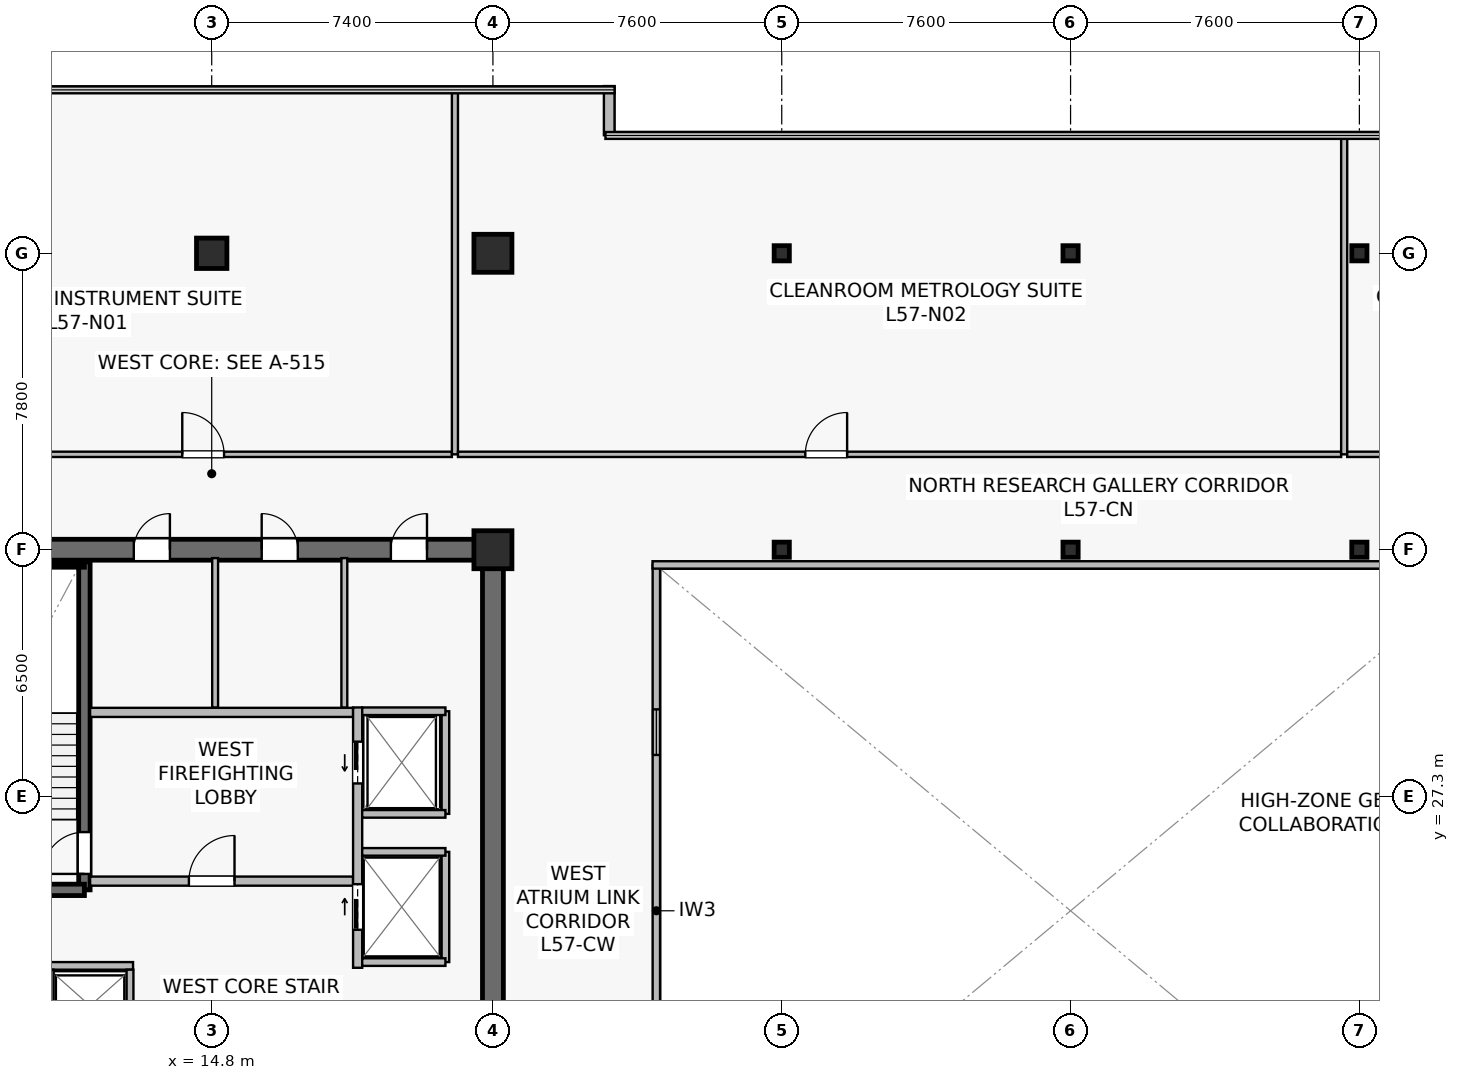
"""IFC4 building model, lengths in metres.
Left out: names, types, materials, properties, quantities, classifications, styles, units other than length and angle.
Written with IfcOpenShell. Run it as: python <this file> out.ifc"""

import sys

from ifc_helpers import new_model, si_unit, direction, frame, frame_2d, origin, origin_2d, place, context, subcontext, project, spatial, rectangle, hollow_rectangle, extrude, source, transform, mapped, element, fill, save


model = new_model("IFC4")
c1 = context("Model", 3, precision=1e-05, world=origin(), true_north=direction((0.0, 1.0)))
c2 = subcontext(c1, "Body", "Model", "MODEL_VIEW")
j1 = project(units=[si_unit("LENGTHUNIT", "METRE"), si_unit("PLANEANGLEUNIT", "RADIAN")], contexts=[c1])
p1 = place(None, origin())
s1 = spatial("IfcSite", under=j1, at=p1, CompositionType="ELEMENT")
p2 = place(p1, origin())
s2 = spatial("IfcBuilding", under=s1, at=p2, CompositionType="ELEMENT")
p3 = place(p2, frame((0.0, 0.0, 238.3)))
s3 = spatial("IfcBuildingStorey", under=s2, at=p3, CompositionType="ELEMENT", Elevation=238.3)
p4 = place(p3, frame((7.125, 33.8, 0.0), z_axis=(0.0, 0.0, 1.0), x_axis=(1.0, 0.0, 0.0)))
e1 = element("IfcWall", 1, at=p4, inside=s3, PredefinedType="SHEAR", context=c2, shape_type="SweptSolid", body=[
    extrude(rectangle(XDim=15.35, YDim=0.55, at=frame_2d((7.675, 0.0))), origin(), (0.0, 0.0, 1.0), 3.8),
])
p5 = place(p4, frame((5.625, 0.0, 0.0)))
e2 = element("IfcOpeningElement", 2, at=p5, cuts=e1, PredefinedType="OPENING", context=c2, shape_type="SweptSolid", body=[
    extrude(rectangle(XDim=0.95, YDim=2.15, at=frame_2d((0.475, 1.075))), frame((0.0, 0.285, 0.0), z_axis=(0.0, -1.0, 0.0), x_axis=(1.0, 0.0, 0.0)), (0.0, 0.0, 1.0), 0.57),
])
p6 = place(p4, frame((8.99, 0.0, 0.0)))
e3 = element("IfcOpeningElement", 3, at=p6, cuts=e1, PredefinedType="OPENING", context=c2, shape_type="SweptSolid", body=[
    extrude(rectangle(XDim=0.95, YDim=2.15, at=frame_2d((0.475, 1.075))), frame((0.0, 0.285, 0.0), z_axis=(0.0, -1.0, 0.0), x_axis=(1.0, 0.0, 0.0)), (0.0, 0.0, 1.0), 0.57),
])
p7 = place(p4, frame((12.39, 0.0, 0.0)))
e4 = element("IfcOpeningElement", 4, at=p7, cuts=e1, PredefinedType="OPENING", context=c2, shape_type="SweptSolid", body=[
    extrude(rectangle(XDim=0.95, YDim=2.15, at=frame_2d((0.475, 1.075))), frame((0.0, 0.285, 0.0), z_axis=(0.0, -1.0, 0.0), x_axis=(1.0, 0.0, 0.0)), (0.0, 0.0, 1.0), 0.57),
])
p8 = place(p3, frame((22.2, 15.075, 0.0), z_axis=(0.0, 0.0, 1.0), x_axis=(0.0, 1.0, 0.0)))
e5 = element("IfcWall", 5, at=p8, inside=s3, PredefinedType="SHEAR", context=c2, shape_type="SweptSolid", body=[
    extrude(rectangle(XDim=18.45, YDim=0.55, at=frame_2d((9.225, 0.0))), origin(), (0.0, 0.0, 1.0), 3.8),
])
p9 = place(p8, frame((3.475, 0.0, 0.0)))
e6 = element("IfcOpeningElement", 6, at=p9, cuts=e5, PredefinedType="OPENING", context=c2, shape_type="SweptSolid", body=[
    extrude(rectangle(XDim=1.42, YDim=2.2, at=frame_2d((0.71, 1.1))), frame((0.0, 0.285, 0.0), z_axis=(0.0, -1.0, 0.0), x_axis=(1.0, 0.0, 0.0)), (0.0, 0.0, 1.0), 0.57),
])
p10 = place(p3, frame((11.45, 24.85, 0.0), z_axis=(0.0, 0.0, 1.0), x_axis=(0.0, 1.0, 0.0)))
e7 = element("IfcWall", 7, at=p10, inside=s3, PredefinedType="SHEAR", context=c2, shape_type="SweptSolid", body=[
    extrude(rectangle(XDim=8.63, YDim=0.3, at=frame_2d((4.315, 0.0))), origin(), (0.0, 0.0, 1.0), 3.8),
])
p11 = place(p10, frame((0.42, 0.0, 0.0)))
e8 = element("IfcOpeningElement", 8, at=p11, cuts=e7, PredefinedType="OPENING", context=c2, shape_type="SweptSolid", body=[
    extrude(rectangle(XDim=1.1, YDim=2.15, at=frame_2d((0.55, 1.075))), frame((0.0, 0.16, 0.0), z_axis=(0.0, -1.0, 0.0), x_axis=(1.0, 0.0, 0.0)), (0.0, 0.0, 1.0), 0.32),
])
p12 = place(p3, frame((7.65, 24.85, 0.0), z_axis=(0.0, 0.0, 1.0), x_axis=(1.0, 0.0, 0.0)))
e9 = element("IfcWall", 9, at=p12, inside=s3, PredefinedType="SHEAR", context=c2, shape_type="SweptSolid", body=[
    extrude(rectangle(XDim=3.8, YDim=0.3, at=frame_2d((1.9, 0.0))), origin(), (0.0, 0.0, 1.0), 3.8),
])
p13 = place(p3, frame((7.73, 33.4, 0.0), z_axis=(0.0, 0.0, 1.0), x_axis=(1.0, 0.0, 0.0)))
e10 = element("IfcWall", 10, at=p13, inside=s3, PredefinedType="SOLIDWALL", context=c2, shape_type="SweptSolid", body=[
    extrude(rectangle(XDim=3.72, YDim=0.12, at=frame_2d((1.86, 0.0))), origin(), (0.0, 0.0, 1.0), 3.8),
])
m1 = source(origin(), c2, "Body", "SweptSolid", [
    extrude(rectangle(XDim=1.0, YDim=1.0, at=origin_2d()), origin(), (0.0, 0.0, 1.0), 4.1),
])
p14 = place(p3, frame((22.2, 33.8, 0.0), z_axis=(0.0, 0.0, 1.0), x_axis=(1.0, 0.0, 0.0)))
e11 = element("IfcColumn", 11, at=p14, inside=s3, PredefinedType="COLUMN", context=c2, shape_type="MappedRepresentation", body=[
    mapped(m1, transform((0.0, 0.0, 0.0), scale=1.0)),
])
m2 = source(origin(), c2, "Body", "SweptSolid", [
    extrude(rectangle(XDim=0.8, YDim=0.8, at=origin_2d()), origin(), (0.0, 0.0, 1.0), 4.1),
])
p15 = place(p3, frame((14.8, 41.6, 0.0), z_axis=(0.0, 0.0, 1.0), x_axis=(1.0, 0.0, 0.0)))
e12 = element("IfcColumn", 12, at=p15, inside=s3, PredefinedType="COLUMN", context=c2, shape_type="MappedRepresentation", body=[
    mapped(m2, transform((0.0, 0.0, 0.0), scale=1.0)),
])
p16 = place(p3, frame((22.2, 41.6, 0.0), z_axis=(0.0, 0.0, 1.0), x_axis=(1.0, 0.0, 0.0)))
e13 = element("IfcColumn", 13, at=p16, inside=s3, PredefinedType="COLUMN", context=c2, shape_type="MappedRepresentation", body=[
    mapped(m1, transform((0.0, 0.0, 0.0), scale=1.0)),
])
m3 = source(origin(), c2, "Body", "SweptSolid", [
    extrude(hollow_rectangle(XDim=0.4, YDim=0.4, WallThickness=0.019, at=origin_2d()), origin(), (0.0, 0.0, 1.0), 4.1),
])
for number, where, z_axis, x_axis in (
    (14, (29.8, 33.8, 0.0), (0.0, 0.0, 1.0), (1.0, 0.0, 0.0)),
    (15, (29.8, 41.6, 0.0), (0.0, 0.0, 1.0), (1.0, 0.0, 0.0)),
    (16, (37.4, 33.8, 0.0), (0.0, 0.0, 1.0), (1.0, 0.0, 0.0)),
    (17, (37.4, 41.6, 0.0), (0.0, 0.0, 1.0), (1.0, 0.0, 0.0)),
    (18, (45.0, 33.8, 0.0), (0.0, 0.0, 1.0), (1.0, 0.0, 0.0)),
    (19, (45.0, 41.6, 0.0), (0.0, 0.0, 1.0), (1.0, 0.0, 0.0)),
):
    element("IfcColumn", number, at=place(p3, frame(where, z_axis=z_axis, x_axis=x_axis)), inside=s3, PredefinedType="COLUMN", context=c2, shape_type="MappedRepresentation", body=[
        mapped(m3, transform((0.0, 0.0, 0.0), scale=1.0)),
    ])
p17 = place(p3, frame((25.26, 44.707, 0.0), z_axis=(0.0, 0.0, 1.0), x_axis=(0.0, 1.0, 0.0)))
e20 = element("IfcWall", 20, at=p17, inside=s3, PredefinedType="STANDARD", context=c2, shape_type="SweptSolid", body=[
    extrude(rectangle(XDim=1.293, YDim=0.28, at=frame_2d((0.646, 0.0))), origin(), (0.0, 0.0, 1.0), 3.8),
])
p18 = place(p3, frame((11.6, 25.08, 0.0), z_axis=(0.0, 0.0, 1.0), x_axis=(1.0, 0.0, 0.0)))
e21 = element("IfcWall", 21, at=p18, inside=s3, PredefinedType="SOLIDWALL", context=c2, shape_type="SweptSolid", body=[
    extrude(rectangle(XDim=6.92, YDim=0.24, at=frame_2d((3.46, 0.0))), origin(), (0.0, 0.0, 1.0), 3.197),
])
p19 = place(p18, frame((2.6, 0.0, 0.0)))
e22 = element("IfcOpeningElement", 22, at=p19, cuts=e21, PredefinedType="OPENING", context=c2, shape_type="SweptSolid", body=[
    extrude(rectangle(XDim=1.2, YDim=2.16, at=frame_2d((0.6, 1.08))), frame((0.0, 0.13, 0.0), z_axis=(0.0, -1.0, 0.0), x_axis=(1.0, 0.0, 0.0)), (0.0, 0.0, 1.0), 0.26),
])
p20 = place(p3, frame((11.6, 29.52, 0.0), z_axis=(0.0, 0.0, 1.0), x_axis=(1.0, 0.0, 0.0)))
e23 = element("IfcWall", 23, at=p20, inside=s3, PredefinedType="SOLIDWALL", context=c2, shape_type="SweptSolid", body=[
    extrude(rectangle(XDim=6.92, YDim=0.24, at=frame_2d((3.46, 0.0))), origin(), (0.0, 0.0, 1.0), 3.197),
])
p21 = place(p3, frame((18.64, 22.8, 0.0), z_axis=(0.0, 0.0, 1.0), x_axis=(0.0, 1.0, 0.0)))
e24 = element("IfcWall", 24, at=p21, inside=s3, PredefinedType="SOLIDWALL", context=c2, shape_type="SweptSolid", body=[
    extrude(rectangle(XDim=6.85, YDim=0.24, at=frame_2d((3.425, 0.0))), origin(), (0.0, 0.0, 1.0), 2.935),
])
p22 = place(p21, frame((4.85, 0.0, 0.0)))
e25 = element("IfcOpeningElement", 25, at=p22, cuts=e24, PredefinedType="OPENING", context=c2, shape_type="SweptSolid", body=[
    extrude(rectangle(XDim=1.1, YDim=2.22, at=frame_2d((0.55, 1.11))), frame((0.0, 0.13, 0.0), z_axis=(0.0, -1.0, 0.0), x_axis=(1.0, 0.0, 0.0)), (0.0, 0.0, 1.0), 0.26),
])
p23 = place(p21, frame((1.0, 0.0, 0.0)))
e26 = element("IfcOpeningElement", 26, at=p23, cuts=e24, PredefinedType="OPENING", context=c2, shape_type="SweptSolid", body=[
    extrude(rectangle(XDim=1.2, YDim=2.22, at=frame_2d((0.6, 1.11))), frame((0.0, 0.13, 0.0), z_axis=(0.0, -1.0, 0.0), x_axis=(1.0, 0.0, 0.0)), (0.0, 0.0, 1.0), 0.26),
])
p24 = place(p3, frame((10.47, 22.85, 0.0), z_axis=(0.0, 0.0, 1.0), x_axis=(1.0, 0.0, 0.0)))
e27 = element("IfcWall", 27, at=p24, inside=s3, PredefinedType="SOLIDWALL", context=c2, shape_type="SweptSolid", body=[
    extrude(rectangle(XDim=2.26, YDim=0.2, at=frame_2d((1.13, 0.0))), origin(), (0.0, 0.0, 1.0), 3.8),
])
for number, where, z_axis, x_axis in (
    (28, (10.55, 20.85, 0.0), (0.0, 0.0, 1.0), (0.0, 1.0, 0.0)),
    (29, (12.65, 20.85, 0.0), (0.0, 0.0, 1.0), (0.0, 1.0, 0.0)),
):
    element("IfcWall", number, at=place(p3, frame(where, z_axis=z_axis, x_axis=x_axis)), inside=s3, PredefinedType="SOLIDWALL", context=c2, shape_type="SweptSolid", body=[
        extrude(rectangle(XDim=1.9, YDim=0.18, at=frame_2d((0.95, 0.0))), origin(), (0.0, 0.0, 1.0), 3.8),
    ])
p25 = place(p3, frame((20.95, 26.85, 0.0), z_axis=(0.0, 0.0, 1.0), x_axis=(0.0, 1.0, 0.0)))
e30 = element("IfcWall", 30, at=p25, inside=s3, PredefinedType="SOLIDWALL", context=c2, shape_type="SweptSolid", body=[
    extrude(rectangle(XDim=2.7, YDim=0.2, at=frame_2d((1.35, 0.0))), origin(), (0.0, 0.0, 1.0), 3.8),
])
p26 = place(p3, frame((18.76, 29.55, 0.0), z_axis=(0.0, 0.0, 1.0), x_axis=(1.0, 0.0, 0.0)))
e31 = element("IfcWall", 31, at=p26, inside=s3, PredefinedType="SOLIDWALL", context=c2, shape_type="SweptSolid", body=[
    extrude(rectangle(XDim=2.19, YDim=0.2, at=frame_2d((1.095, 0.0))), origin(), (0.0, 0.0, 1.0), 3.8),
])
p27 = place(p3, frame((18.76, 26.85, 0.0), z_axis=(0.0, 0.0, 1.0), x_axis=(1.0, 0.0, 0.0)))
e32 = element("IfcWall", 32, at=p27, inside=s3, PredefinedType="SOLIDWALL", context=c2, shape_type="SweptSolid", body=[
    extrude(rectangle(XDim=2.19, YDim=0.2, at=frame_2d((1.095, 0.0))), origin(), (0.0, 0.0, 1.0), 3.197),
])
p28 = place(p3, frame((20.95, 22.95, 0.0), z_axis=(0.0, 0.0, 1.0), x_axis=(0.0, 1.0, 0.0)))
e33 = element("IfcWall", 33, at=p28, inside=s3, PredefinedType="SOLIDWALL", context=c2, shape_type="SweptSolid", body=[
    extrude(rectangle(XDim=2.9, YDim=0.2, at=frame_2d((1.45, 0.0))), origin(), (0.0, 0.0, 1.0), 2.935),
])
for number, where, z_axis, x_axis in (
    (34, (18.76, 25.85, 0.0), (0.0, 0.0, 1.0), (1.0, 0.0, 0.0)),
    (35, (18.76, 22.95, 0.0), (0.0, 0.0, 1.0), (1.0, 0.0, 0.0)),
):
    element("IfcWall", number, at=place(p3, frame(where, z_axis=z_axis, x_axis=x_axis)), inside=s3, PredefinedType="SOLIDWALL", context=c2, shape_type="SweptSolid", body=[
        extrude(rectangle(XDim=2.19, YDim=0.2, at=frame_2d((1.095, 0.0))), origin(), (0.0, 0.0, 1.0), 3.8),
    ])
p29 = place(p3, frame((14.89, 29.65, 0.0), z_axis=(0.0, 0.0, 1.0), x_axis=(0.0, 1.0, 0.0)))
e36 = element("IfcWall", 36, at=p29, inside=s3, PredefinedType="PLUMBINGWALL", context=c2, shape_type="SweptSolid", body=[
    extrude(rectangle(XDim=3.93, YDim=0.155, at=frame_2d((1.965, 0.0))), origin(), (0.0, 0.0, 1.0), 3.197),
])
p30 = place(p3, frame((18.29, 29.65, 0.0), z_axis=(0.0, 0.0, 1.0), x_axis=(0.0, 1.0, 0.0)))
e37 = element("IfcWall", 37, at=p30, inside=s3, PredefinedType="PLUMBINGWALL", context=c2, shape_type="SweptSolid", body=[
    extrude(rectangle(XDim=3.93, YDim=0.155, at=frame_2d((1.965, 0.0))), origin(), (0.0, 0.0, 1.0), 3.8),
])
p31 = place(p3, frame((26.5, 15.2, 0.0), z_axis=(0.0, 0.0, 1.0), x_axis=(0.0, 1.0, 0.0)))
e38 = element("IfcWall", 38, at=p31, inside=s3, PredefinedType="SOLIDWALL", context=c2, shape_type="SweptSolid", body=[
    extrude(rectangle(XDim=18.2, YDim=0.195, at=frame_2d((9.1, 0.0))), origin(), (0.0, 0.0, 1.0), 3.8),
])
p32 = place(p31, frame((1.8, 0.0, 0.9)))
e39 = element("IfcOpeningElement", 39, at=p32, cuts=e38, PredefinedType="OPENING", context=c2, shape_type="SweptSolid", body=[
    extrude(rectangle(XDim=1.2, YDim=1.35, at=frame_2d((0.6, 0.675))), frame((0.0, 0.107, 0.0), z_axis=(0.0, -1.0, 0.0), x_axis=(1.0, 0.0, 0.0)), (0.0, 0.0, 1.0), 0.215),
])
p33 = place(p31, frame((13.2, 0.0, 0.9)))
e40 = element("IfcOpeningElement", 40, at=p33, cuts=e38, PredefinedType="OPENING", context=c2, shape_type="SweptSolid", body=[
    extrude(rectangle(XDim=1.2, YDim=1.35, at=frame_2d((0.6, 0.675))), frame((0.0, 0.107, 0.0), z_axis=(0.0, -1.0, 0.0), x_axis=(1.0, 0.0, 0.0)), (0.0, 0.0, 1.0), 0.215),
])
p34 = place(p3, frame((26.4, 33.4, 0.0), z_axis=(0.0, 0.0, 1.0), x_axis=(1.0, 0.0, 0.0)))
e41 = element("IfcWall", 41, at=p34, inside=s3, PredefinedType="SOLIDWALL", context=c2, shape_type="SweptSolid", body=[
    extrude(rectangle(XDim=22.0, YDim=0.195, at=frame_2d((11.0, 0.0))), origin(), (0.0, 0.0, 1.0), 3.8),
])
p35 = place(p3, frame((7.31, 36.31, 0.0), z_axis=(0.0, 0.0, 1.0), x_axis=(1.0, 0.0, 0.0)))
e42 = element("IfcWall", 42, at=p35, inside=s3, PredefinedType="PARTITIONING", context=c2, shape_type="SweptSolid", body=[
    extrude(rectangle(XDim=13.81, YDim=0.14, at=frame_2d((6.905, 0.0))), origin(), (0.0, 0.0, 1.0), 3.197),
])
p36 = place(p35, frame((6.715, 0.0, 0.0)))
e43 = element("IfcOpeningElement", 43, at=p36, cuts=e42, PredefinedType="OPENING", context=c2, shape_type="SweptSolid", body=[
    extrude(rectangle(XDim=1.1, YDim=2.18, at=frame_2d((0.55, 1.09))), frame((0.0, 0.08, 0.0), z_axis=(0.0, -1.0, 0.0), x_axis=(1.0, 0.0, 0.0)), (0.0, 0.0, 1.0), 0.16),
])
p37 = place(p3, frame((21.2, 36.31, 0.0), z_axis=(0.0, 0.0, 1.0), x_axis=(0.0, 1.0, 0.0)))
e44 = element("IfcWall", 44, at=p37, inside=s3, PredefinedType="PARTITIONING", context=c2, shape_type="SweptSolid", body=[
    extrude(rectangle(XDim=9.58, YDim=0.16, at=frame_2d((4.79, 0.0))), origin(), (0.0, 0.0, 1.0), 3.135),
])
p38 = place(p3, frame((21.28, 36.31, 0.0), z_axis=(0.0, 0.0, 1.0), x_axis=(1.0, 0.0, 0.0)))
e45 = element("IfcWall", 45, at=p38, inside=s3, PredefinedType="PARTITIONING", context=c2, shape_type="SweptSolid", body=[
    extrude(rectangle(XDim=23.24, YDim=0.14, at=frame_2d((11.62, 0.0))), origin(), (0.0, 0.0, 1.0), 3.197),
])
p39 = place(p38, frame((9.14, 0.0, 0.0)))
e46 = element("IfcOpeningElement", 46, at=p39, cuts=e45, PredefinedType="OPENING", context=c2, shape_type="SweptSolid", body=[
    extrude(rectangle(XDim=1.1, YDim=2.18, at=frame_2d((0.55, 1.09))), frame((0.0, 0.08, 0.0), z_axis=(0.0, -1.0, 0.0), x_axis=(1.0, 0.0, 0.0)), (0.0, 0.0, 1.0), 0.16),
])
p40 = place(p3, frame((44.6, 36.31, 0.0), z_axis=(0.0, 0.0, 1.0), x_axis=(0.0, 1.0, 0.0)))
e47 = element("IfcWall", 47, at=p40, inside=s3, PredefinedType="PARTITIONING", context=c2, shape_type="SweptSolid", body=[
    extrude(rectangle(XDim=8.38, YDim=0.16, at=frame_2d((4.19, 0.0))), origin(), (0.0, 0.0, 1.0), 3.135),
])
p41 = place(p3, frame((44.68, 36.31, 0.0), z_axis=(0.0, 0.0, 1.0), x_axis=(1.0, 0.0, 0.0)))
e48 = element("IfcWall", 48, at=p41, inside=s3, PredefinedType="PARTITIONING", context=c2, shape_type="SweptSolid", body=[
    extrude(rectangle(XDim=22.81, YDim=0.14, at=frame_2d((11.405, 0.0))), origin(), (0.0, 0.0, 1.0), 3.197),
])
p42 = place(p41, frame((11.485, 0.0, 0.0)))
e49 = element("IfcOpeningElement", 49, at=p42, cuts=e48, PredefinedType="OPENING", context=c2, shape_type="SweptSolid", body=[
    extrude(rectangle(XDim=1.1, YDim=2.18, at=frame_2d((0.55, 1.09))), frame((0.0, 0.08, 0.0), z_axis=(0.0, -1.0, 0.0), x_axis=(1.0, 0.0, 0.0)), (0.0, 0.0, 1.0), 0.16),
])
m4 = source(origin(), c2, "Body", "SweptSolid", [
    extrude(rectangle(XDim=1.2, YDim=1.35, at=frame_2d((0.6, 0.675))), frame((0.0, 0.03, 0.0), z_axis=(0.0, -1.0, 0.0), x_axis=(1.0, 0.0, 0.0)), (0.0, 0.0, 1.0), 0.06),
])
p43 = place(p33, origin())
e50 = element("IfcWindow", 50, at=p43, inside=s3, PartitioningType="SINGLE_PANEL", PredefinedType="WINDOW", context=c2, shape_type="MappedRepresentation", body=[
    mapped(m4, transform((0.0, 0.0, 0.0), scale=1.0)),
])
fill(e40, e50)
m5 = source(origin(), c2, "Body", "SweptSolid", [
    extrude(rectangle(XDim=1.1, YDim=2.15, at=frame_2d((0.55, 1.075))), frame((0.0, 0.025, 0.0), z_axis=(0.0, -1.0, 0.0), x_axis=(1.0, 0.0, 0.0)), (0.0, 0.0, 1.0), 0.05),
])
p44 = place(p11, origin())
e51 = element("IfcDoor", 51, at=p44, inside=s3, OperationType="SINGLE_SWING_LEFT", PredefinedType="DOOR", context=c2, shape_type="MappedRepresentation", body=[
    mapped(m5, transform((0.0, 0.0, 0.0), scale=1.0)),
])
fill(e8, e51)
m6 = source(origin(), c2, "Body", "SweptSolid", [
    extrude(rectangle(XDim=1.2, YDim=2.16, at=frame_2d((0.6, 1.08))), frame((0.0, 0.025, 0.0), z_axis=(0.0, -1.0, 0.0), x_axis=(1.0, 0.0, 0.0)), (0.0, 0.0, 1.0), 0.05),
])
p45 = place(p19, origin())
e52 = element("IfcDoor", 52, at=p45, inside=s3, OperationType="SINGLE_SWING_RIGHT", PredefinedType="DOOR", context=c2, shape_type="MappedRepresentation", body=[
    mapped(m6, transform((0.0, 0.0, 0.0), scale=1.0)),
])
fill(e22, e52)
m7 = source(origin(), c2, "Body", "SweptSolid", [
    extrude(rectangle(XDim=1.1, YDim=2.22, at=frame_2d((0.55, 1.11))), frame((0.0, 0.025, 0.0), z_axis=(0.0, -1.0, 0.0), x_axis=(1.0, 0.0, 0.0)), (0.0, 0.0, 1.0), 0.05),
])
p46 = place(p22, origin())
e53 = element("IfcDoor", 53, at=p46, inside=s3, OperationType="SLIDING_TO_LEFT", PredefinedType="USERDEFINED", context=c2, shape_type="MappedRepresentation", body=[
    mapped(m7, transform((0.0, 0.0, 0.0), scale=1.0)),
])
fill(e25, e53)
m8 = source(origin(), c2, "Body", "SweptSolid", [
    extrude(rectangle(XDim=1.2, YDim=2.22, at=frame_2d((0.6, 1.11))), frame((0.0, 0.025, 0.0), z_axis=(0.0, -1.0, 0.0), x_axis=(1.0, 0.0, 0.0)), (0.0, 0.0, 1.0), 0.05),
])
p47 = place(p23, origin())
e54 = element("IfcDoor", 54, at=p47, inside=s3, OperationType="SLIDING_TO_RIGHT", PredefinedType="USERDEFINED", context=c2, shape_type="MappedRepresentation", body=[
    mapped(m8, transform((0.0, 0.0, 0.0), scale=1.0)),
])
fill(e26, e54)
m9 = source(origin(), c2, "Body", "SweptSolid", [
    extrude(rectangle(XDim=0.95, YDim=2.15, at=frame_2d((0.475, 1.075))), frame((0.0, 0.025, 0.0), z_axis=(0.0, -1.0, 0.0), x_axis=(1.0, 0.0, 0.0)), (0.0, 0.0, 1.0), 0.05),
])
p48 = place(p5, origin())
e55 = element("IfcDoor", 55, at=p48, inside=s3, OperationType="SINGLE_SWING_RIGHT", PredefinedType="DOOR", context=c2, shape_type="MappedRepresentation", body=[
    mapped(m9, transform((0.0, 0.0, 0.0), scale=1.0)),
])
fill(e2, e55)
p49 = place(p6, origin())
e56 = element("IfcDoor", 56, at=p49, inside=s3, OperationType="SINGLE_SWING_LEFT", PredefinedType="DOOR", context=c2, shape_type="MappedRepresentation", body=[
    mapped(m9, transform((0.0, 0.0, 0.0), scale=1.0)),
])
fill(e3, e56)
p50 = place(p7, origin())
e57 = element("IfcDoor", 57, at=p50, inside=s3, OperationType="SINGLE_SWING_RIGHT", PredefinedType="DOOR", context=c2, shape_type="MappedRepresentation", body=[
    mapped(m9, transform((0.0, 0.0, 0.0), scale=1.0)),
])
fill(e4, e57)
m10 = source(origin(), c2, "Body", "SweptSolid", [
    extrude(rectangle(XDim=1.1, YDim=2.18, at=frame_2d((0.55, 1.09))), frame((0.0, 0.025, 0.0), z_axis=(0.0, -1.0, 0.0), x_axis=(1.0, 0.0, 0.0)), (0.0, 0.0, 1.0), 0.05),
])
p51 = place(p36, origin())
e58 = element("IfcDoor", 58, at=p51, inside=s3, OperationType="SINGLE_SWING_LEFT", PredefinedType="DOOR", context=c2, shape_type="MappedRepresentation", body=[
    mapped(m10, transform((0.0, 0.0, 0.0), scale=1.0)),
])
fill(e43, e58)
p52 = place(p39, origin())
e59 = element("IfcDoor", 59, at=p52, inside=s3, OperationType="SINGLE_SWING_RIGHT", PredefinedType="DOOR", context=c2, shape_type="MappedRepresentation", body=[
    mapped(m10, transform((0.0, 0.0, 0.0), scale=1.0)),
])
fill(e46, e59)
save(model, sys.argv[1])
